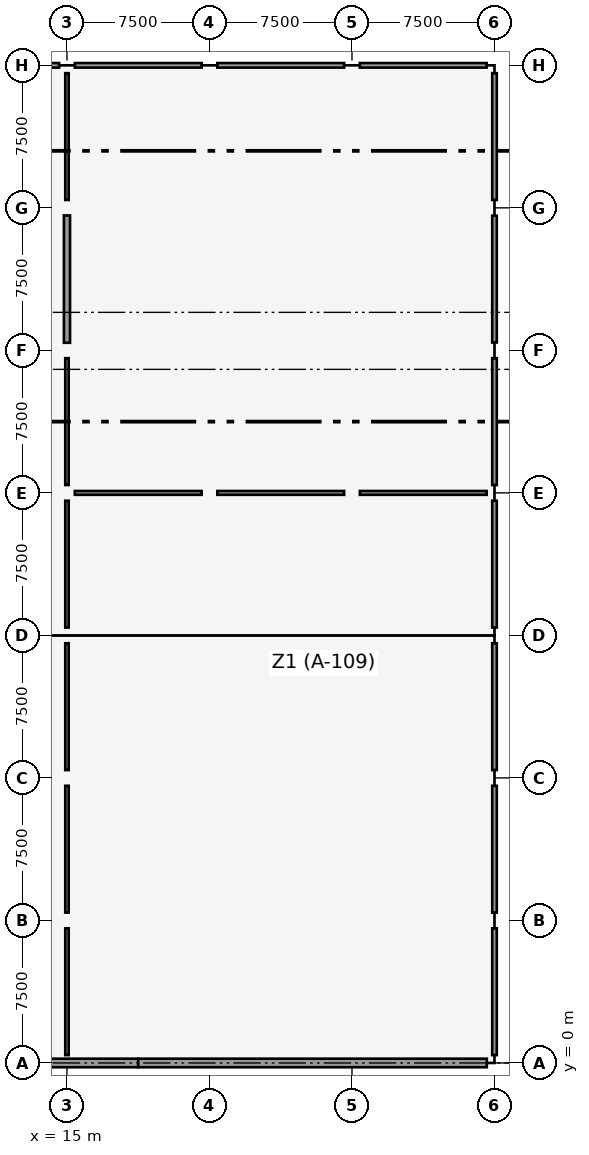
"""IFC4 building model, lengths in metres.
Left out: names, types, materials, properties, quantities, classifications, styles, units other than length and angle.
Written with IfcOpenShell. Run it as: python <this file> out.ifc"""

import sys

from ifc_helpers import new_model, si_unit, direction, frame, frame_2d, origin, origin_2d, place, context, subcontext, project, spatial, rectangle, extrude, element, fill, save


model = new_model("IFC4")
c1 = context("Model", 3, precision=1e-05, world=origin(), true_north=direction((0.0, 1.0)))
c2 = subcontext(c1, "Body", "Model", "MODEL_VIEW")
j1 = project(units=[si_unit("LENGTHUNIT", "METRE"), si_unit("PLANEANGLEUNIT", "RADIAN")], contexts=[c1])
p1 = place(None, origin())
s1 = spatial("IfcSite", under=j1, at=p1, CompositionType="ELEMENT")
p2 = place(p1, origin())
s2 = spatial("IfcBuilding", under=s1, at=p2, CompositionType="ELEMENT")
p3 = place(p2, frame((0.0, 0.0, -4.8)))
s3 = spatial("IfcBuildingStorey", under=s2, at=p3, CompositionType="ELEMENT", Elevation=-4.8)
for number, where, z_axis, x_axis in (
    (1, (15.0, 0.0, 0.0), (0.0, 0.0, 1.0), (1.0, 0.0, 0.0)),
    (2, (15.0, 7.5, 0.0), (0.0, 0.0, 1.0), (1.0, 0.0, 0.0)),
    (3, (15.0, 15.0, 0.0), (0.0, 0.0, 1.0), (1.0, 0.0, 0.0)),
    (4, (15.0, 22.5, 0.0), (0.0, 0.0, 1.0), (1.0, 0.0, 0.0)),
    (5, (15.0, 30.0, 0.0), (0.0, 0.0, 1.0), (1.0, 0.0, 0.0)),
    (6, (15.0, 37.5, 0.0), (0.0, 0.0, 1.0), (1.0, 0.0, 0.0)),
    (7, (15.0, 45.0, 0.0), (0.0, 0.0, 1.0), (1.0, 0.0, 0.0)),
    (8, (15.0, 52.5, 0.0), (0.0, 0.0, 1.0), (1.0, 0.0, 0.0)),
    (9, (22.5, 0.0, 0.0), (0.0, 0.0, 1.0), (1.0, 0.0, 0.0)),
    (10, (22.5, 7.5, 0.0), (0.0, 0.0, 1.0), (1.0, 0.0, 0.0)),
    (11, (22.5, 15.0, 0.0), (0.0, 0.0, 1.0), (1.0, 0.0, 0.0)),
    (12, (22.5, 22.5, 0.0), (0.0, 0.0, 1.0), (1.0, 0.0, 0.0)),
    (13, (22.5, 30.0, 0.0), (0.0, 0.0, 1.0), (1.0, 0.0, 0.0)),
    (14, (22.5, 37.5, 0.0), (0.0, 0.0, 1.0), (1.0, 0.0, 0.0)),
    (15, (22.5, 45.0, 0.0), (0.0, 0.0, 1.0), (1.0, 0.0, 0.0)),
    (16, (22.5, 52.5, 0.0), (0.0, 0.0, 1.0), (1.0, 0.0, 0.0)),
    (17, (30.0, 0.0, 0.0), (0.0, 0.0, 1.0), (1.0, 0.0, 0.0)),
    (18, (30.0, 7.5, 0.0), (0.0, 0.0, 1.0), (1.0, 0.0, 0.0)),
    (19, (30.0, 15.0, 0.0), (0.0, 0.0, 1.0), (1.0, 0.0, 0.0)),
    (20, (30.0, 22.5, 0.0), (0.0, 0.0, 1.0), (1.0, 0.0, 0.0)),
    (21, (30.0, 30.0, 0.0), (0.0, 0.0, 1.0), (1.0, 0.0, 0.0)),
    (22, (30.0, 37.5, 0.0), (0.0, 0.0, 1.0), (1.0, 0.0, 0.0)),
    (23, (30.0, 45.0, 0.0), (0.0, 0.0, 1.0), (1.0, 0.0, 0.0)),
    (24, (30.0, 52.5, 0.0), (0.0, 0.0, 1.0), (1.0, 0.0, 0.0)),
    (25, (37.5, 0.0, 0.0), (0.0, 0.0, 1.0), (1.0, 0.0, 0.0)),
    (26, (37.5, 7.5, 0.0), (0.0, 0.0, 1.0), (1.0, 0.0, 0.0)),
    (27, (37.5, 15.0, 0.0), (0.0, 0.0, 1.0), (1.0, 0.0, 0.0)),
    (28, (37.5, 22.5, 0.0), (0.0, 0.0, 1.0), (1.0, 0.0, 0.0)),
    (29, (37.5, 30.0, 0.0), (0.0, 0.0, 1.0), (1.0, 0.0, 0.0)),
    (30, (37.5, 37.5, 0.0), (0.0, 0.0, 1.0), (1.0, 0.0, 0.0)),
    (31, (37.5, 45.0, 0.0), (0.0, 0.0, 1.0), (1.0, 0.0, 0.0)),
    (32, (37.5, 52.5, 0.0), (0.0, 0.0, 1.0), (1.0, 0.0, 0.0)),
):
    element("IfcColumn", number, at=place(p3, frame(where, z_axis=z_axis, x_axis=x_axis)), inside=s3, PredefinedType="COLUMN", context=c2, shape_type="SweptSolid", body=[
        extrude(rectangle(XDim=0.8, YDim=0.8, at=origin_2d()), origin(), (0.0, 0.0, 1.0), 4.8),
    ])
p4 = place(p3, frame((0.415, 0.0, 0.0), z_axis=(0.0, 0.0, 1.0), x_axis=(1.0, 0.0, 0.0)))
e33 = element("IfcWall", 33, at=p4, inside=s3, PredefinedType="USERDEFINED", context=c2, shape_type="SweptSolid", body=[
    extrude(rectangle(XDim=18.335, YDim=0.45, at=frame_2d((9.167, 0.0))), origin(), (0.0, 0.0, 1.0), 4.5),
])
p5 = place(p3, frame((18.75, 0.0, 0.0), z_axis=(0.0, 0.0, 1.0), x_axis=(1.0, 0.0, 0.0)))
e34 = element("IfcWall", 34, at=p5, inside=s3, PredefinedType="USERDEFINED", context=c2, shape_type="SweptSolid", body=[
    extrude(rectangle(XDim=18.345, YDim=0.45, at=frame_2d((9.172, 0.0))), origin(), (0.0, 0.0, 1.0), 4.5),
])
p6 = place(p3, frame((15.0, 37.9, 0.0), z_axis=(0.0, 0.0, 1.0), x_axis=(0.0, 1.0, 0.0)))
e35 = element("IfcWall", 35, at=p6, inside=s3, PredefinedType="SHEAR", context=c2, shape_type="SweptSolid", body=[
    extrude(rectangle(XDim=6.7, YDim=0.32, at=frame_2d((3.35, 0.0))), origin(), (0.0, 0.0, 1.0), 4.5),
])
p7 = place(p3, frame((7.914, 52.5, 0.0), z_axis=(0.0, 0.0, 1.0), x_axis=(1.0, 0.0, 0.0)))
e36 = element("IfcWall", 36, at=p7, inside=s3, PredefinedType="PARTITIONING", context=c2, shape_type="SweptSolid", body=[
    extrude(rectangle(XDim=6.672, YDim=0.24, at=frame_2d((3.336, 0.0))), origin(), (0.0, 0.0, 1.0), 3.77),
])
for number, where, z_axis, x_axis in (
    (37, (15.414, 52.5, 0.0), (0.0, 0.0, 1.0), (1.0, 0.0, 0.0)),
    (38, (22.914, 52.5, 0.0), (0.0, 0.0, 1.0), (1.0, 0.0, 0.0)),
    (39, (30.414, 52.5, 0.0), (0.0, 0.0, 1.0), (1.0, 0.0, 0.0)),
):
    element("IfcWall", number, at=place(p3, frame(where, z_axis=z_axis, x_axis=x_axis)), inside=s3, PredefinedType="PARTITIONING", context=c2, shape_type="SweptSolid", body=[
        extrude(rectangle(XDim=6.672, YDim=0.24, at=frame_2d((3.336, 0.0))), origin(), (0.0, 0.0, 1.0), 3.87),
    ])
for number, where, z_axis, x_axis in (
    (40, (37.5, 0.414, 0.0), (0.0, 0.0, 1.0), (0.0, 1.0, 0.0)),
    (41, (37.5, 7.914, 0.0), (0.0, 0.0, 1.0), (0.0, 1.0, 0.0)),
    (42, (37.5, 15.414, 0.0), (0.0, 0.0, 1.0), (0.0, 1.0, 0.0)),
    (43, (37.5, 22.914, 0.0), (0.0, 0.0, 1.0), (0.0, 1.0, 0.0)),
    (44, (37.5, 30.414, 0.0), (0.0, 0.0, 1.0), (0.0, 1.0, 0.0)),
    (45, (37.5, 37.914, 0.0), (0.0, 0.0, 1.0), (0.0, 1.0, 0.0)),
    (46, (37.5, 45.414, 0.0), (0.0, 0.0, 1.0), (0.0, 1.0, 0.0)),
):
    element("IfcWall", number, at=place(p3, frame(where, z_axis=z_axis, x_axis=x_axis)), inside=s3, PredefinedType="PARTITIONING", context=c2, shape_type="SweptSolid", body=[
        extrude(rectangle(XDim=6.672, YDim=0.24, at=frame_2d((3.336, 0.0))), origin(), (0.0, 0.0, 1.0), 3.57),
    ])
p8 = place(p3, frame((15.414, 30.0, 0.0), z_axis=(0.0, 0.0, 1.0), x_axis=(1.0, 0.0, 0.0)))
e47 = element("IfcWall", 47, at=p8, inside=s3, PredefinedType="PARTITIONING", context=c2, shape_type="SweptSolid", body=[
    extrude(rectangle(XDim=6.672, YDim=0.2, at=frame_2d((3.336, 0.0))), origin(), (0.0, 0.0, 1.0), 3.42),
])
p9 = place(p3, frame((22.914, 30.0, 0.0), z_axis=(0.0, 0.0, 1.0), x_axis=(1.0, 0.0, 0.0)))
e48 = element("IfcWall", 48, at=p9, inside=s3, PredefinedType="PARTITIONING", context=c2, shape_type="SweptSolid", body=[
    extrude(rectangle(XDim=6.672, YDim=0.2, at=frame_2d((3.336, 0.0))), origin(), (0.0, 0.0, 1.0), 3.52),
])
p10 = place(p3, frame((30.414, 30.0, 0.0), z_axis=(0.0, 0.0, 1.0), x_axis=(1.0, 0.0, 0.0)))
e49 = element("IfcWall", 49, at=p10, inside=s3, PredefinedType="PARTITIONING", context=c2, shape_type="SweptSolid", body=[
    extrude(rectangle(XDim=6.672, YDim=0.2, at=frame_2d((3.336, 0.0))), origin(), (0.0, 0.0, 1.0), 3.57),
])
p11 = place(p3, frame((15.0, 0.414, 0.0), z_axis=(0.0, 0.0, 1.0), x_axis=(0.0, 1.0, 0.0)))
e50 = element("IfcWall", 50, at=p11, inside=s3, PredefinedType="PARTITIONING", context=c2, shape_type="SweptSolid", body=[
    extrude(rectangle(XDim=6.672, YDim=0.18, at=frame_2d((3.336, 0.0))), origin(), (0.0, 0.0, 1.0), 3.42),
])
p12 = place(p3, frame((15.0, 7.914, 0.0), z_axis=(0.0, 0.0, 1.0), x_axis=(0.0, 1.0, 0.0)))
e51 = element("IfcWall", 51, at=p12, inside=s3, PredefinedType="PARTITIONING", context=c2, shape_type="SweptSolid", body=[
    extrude(rectangle(XDim=6.672, YDim=0.18, at=frame_2d((3.336, 0.0))), origin(), (0.0, 0.0, 1.0), 3.42),
])
p13 = place(p12, frame((2.536, 0.0, 0.0)))
e52 = element("IfcOpeningElement", 52, at=p13, cuts=e51, PredefinedType="OPENING", context=c2, shape_type="SweptSolid", body=[
    extrude(rectangle(XDim=1.6, YDim=2.15, at=frame_2d((0.8, 1.075))), frame((0.0, 0.1, 0.0), z_axis=(0.0, -1.0, 0.0), x_axis=(1.0, 0.0, 0.0)), (0.0, 0.0, 1.0), 0.2),
])
for number, where, z_axis, x_axis in (
    (53, (15.0, 15.414, 0.0), (0.0, 0.0, 1.0), (0.0, 1.0, 0.0)),
    (54, (15.0, 22.914, 0.0), (0.0, 0.0, 1.0), (0.0, 1.0, 0.0)),
    (55, (15.0, 30.414, 0.0), (0.0, 0.0, 1.0), (0.0, 1.0, 0.0)),
):
    element("IfcWall", number, at=place(p3, frame(where, z_axis=z_axis, x_axis=x_axis)), inside=s3, PredefinedType="PARTITIONING", context=c2, shape_type="SweptSolid", body=[
        extrude(rectangle(XDim=6.672, YDim=0.18, at=frame_2d((3.336, 0.0))), origin(), (0.0, 0.0, 1.0), 3.42),
    ])
p14 = place(p3, frame((15.0, 45.414, 0.0), z_axis=(0.0, 0.0, 1.0), x_axis=(0.0, 1.0, 0.0)))
e56 = element("IfcWall", 56, at=p14, inside=s3, PredefinedType="PARTITIONING", context=c2, shape_type="SweptSolid", body=[
    extrude(rectangle(XDim=6.672, YDim=0.18, at=frame_2d((3.336, 0.0))), origin(), (0.0, 0.0, 1.0), 3.42),
])
p15 = place(p14, frame((2.836, 0.0, 0.0)))
e57 = element("IfcOpeningElement", 57, at=p15, cuts=e56, PredefinedType="OPENING", context=c2, shape_type="SweptSolid", body=[
    extrude(rectangle(XDim=1.0, YDim=2.12, at=frame_2d((0.5, 1.06))), frame((0.0, 0.1, 0.0), z_axis=(0.0, -1.0, 0.0), x_axis=(1.0, 0.0, 0.0)), (0.0, 0.0, 1.0), 0.2),
])
p16 = place(p13, origin())
e58 = element("IfcDoor", 58, at=p16, inside=s3, OperationType="SINGLE_SWING_RIGHT", PredefinedType="DOOR", context=c2, shape_type="SweptSolid", body=[
    extrude(rectangle(XDim=1.6, YDim=2.15, at=frame_2d((0.8, 1.075))), frame((0.0, 0.025, 0.0), z_axis=(0.0, -1.0, 0.0), x_axis=(1.0, 0.0, 0.0)), (0.0, 0.0, 1.0), 0.05),
])
fill(e52, e58)
p17 = place(p15, origin())
e59 = element("IfcDoor", 59, at=p17, inside=s3, OperationType="SINGLE_SWING_LEFT", PredefinedType="DOOR", context=c2, shape_type="SweptSolid", body=[
    extrude(rectangle(XDim=1.0, YDim=2.12, at=frame_2d((0.5, 1.06))), frame((0.0, 0.025, 0.0), z_axis=(0.0, -1.0, 0.0), x_axis=(1.0, 0.0, 0.0)), (0.0, 0.0, 1.0), 0.05),
])
fill(e57, e59)
save(model, sys.argv[1])
